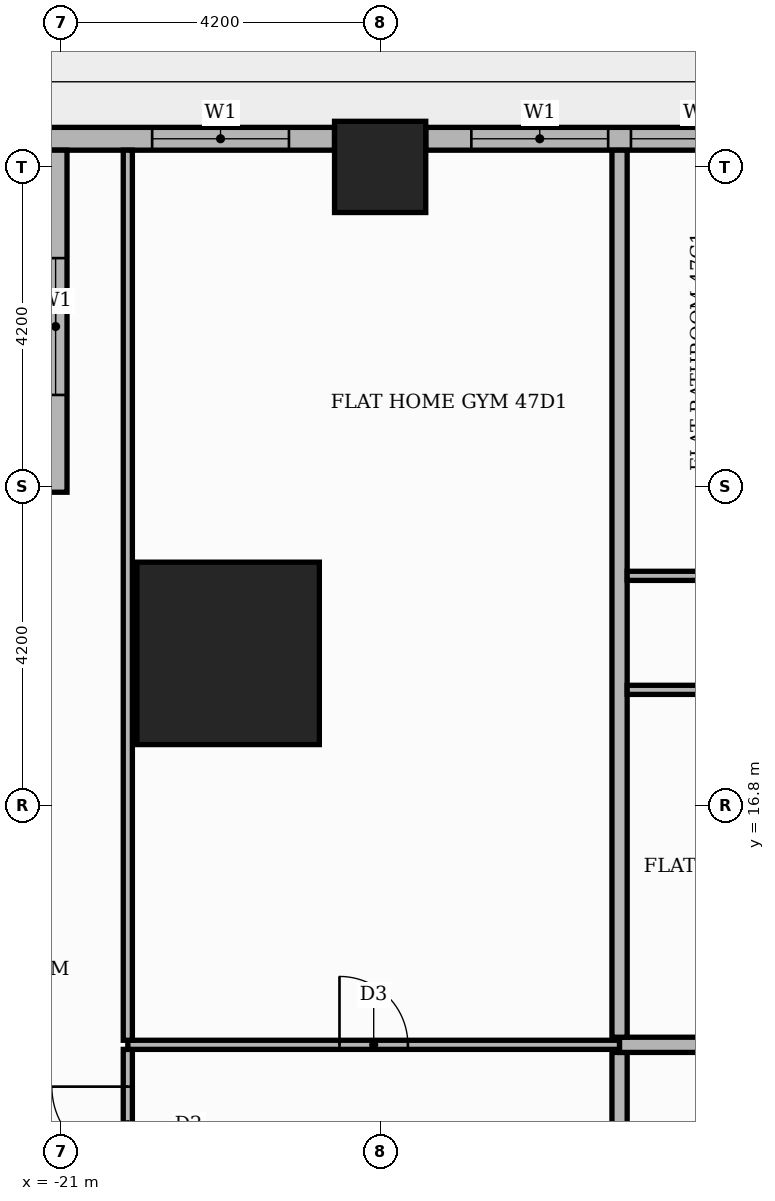
"""IFC4 building model, lengths in metres.
Left out: names, types, materials, properties, quantities, classifications, styles, units other than length and angle.
Written with IfcOpenShell. Run it as: python <this file> out.ifc"""

import sys

from ifc_helpers import new_model, si_unit, direction, frame, frame_2d, origin, origin_2d, place, context, subcontext, project, spatial, rectangle, extrude, element, fill, save


model = new_model("IFC4")
c1 = context("Model", 3, precision=1e-05, world=origin(), true_north=direction((0.0, 1.0)))
c2 = subcontext(c1, "Body", "Model", "MODEL_VIEW")
j1 = project(units=[si_unit("LENGTHUNIT", "METRE"), si_unit("PLANEANGLEUNIT", "RADIAN")], contexts=[c1])
p1 = place(None, origin())
s1 = spatial("IfcSite", under=j1, at=p1, CompositionType="ELEMENT")
p2 = place(p1, origin())
s2 = spatial("IfcBuilding", under=s1, at=p2, CompositionType="ELEMENT")
p3 = place(p2, frame((0.0, 0.0, 200.1)))
s3 = spatial("IfcBuildingStorey", under=s2, at=p3, CompositionType="ELEMENT", Elevation=200.1)
p4 = place(p3, frame((-18.8, 18.8, 0.0), z_axis=(0.0, 0.0, 1.0), x_axis=(1.0, 0.0, 0.0)))
e1 = element("IfcColumn", 1, at=p4, inside=s3, PredefinedType="COLUMN", context=c2, shape_type="SweptSolid", body=[
    extrude(rectangle(XDim=2.4, YDim=2.4, at=origin_2d()), origin(), (0.0, 0.0, 1.0), 3.9),
])
p5 = place(p3, frame((-16.8, 25.2, 0.0), z_axis=(0.0, 0.0, 1.0), x_axis=(1.0, 0.0, 0.0)))
e2 = element("IfcColumn", 2, at=p5, inside=s3, PredefinedType="COLUMN", context=c2, shape_type="SweptSolid", body=[
    extrude(rectangle(XDim=1.2, YDim=1.2, at=origin_2d()), origin(), (0.0, 0.0, 1.0), 3.9),
])
p6 = place(p3, frame((-9.0, 25.57, 0.0), z_axis=(0.0, 0.0, 1.0), x_axis=(-1.0, 0.0, 0.0)))
e3 = element("IfcWall", 3, at=p6, inside=s3, PredefinedType="STANDARD", context=c2, shape_type="SweptSolid", body=[
    extrude(rectangle(XDim=7.2, YDim=0.3, at=frame_2d((3.6, 0.0))), origin(), (0.0, 0.0, 1.0), 3.48),
])
p7 = place(p6, frame((0.6, 0.0, 0.9)))
e4 = element("IfcOpeningElement", 4, at=p7, cuts=e3, PredefinedType="OPENING", context=c2, shape_type="SweptSolid", body=[
    extrude(rectangle(XDim=1.8, YDim=2.1, at=frame_2d((0.9, 1.05))), frame((0.0, 0.16, 0.0), z_axis=(0.0, -1.0, 0.0), x_axis=(1.0, 0.0, 0.0)), (0.0, 0.0, 1.0), 0.32),
])
p8 = place(p6, frame((2.7, 0.0, 0.9)))
e5 = element("IfcOpeningElement", 5, at=p8, cuts=e3, PredefinedType="OPENING", context=c2, shape_type="SweptSolid", body=[
    extrude(rectangle(XDim=1.8, YDim=2.1, at=frame_2d((0.9, 1.05))), frame((0.0, 0.16, 0.0), z_axis=(0.0, -1.0, 0.0), x_axis=(1.0, 0.0, 0.0)), (0.0, 0.0, 1.0), 0.32),
])
p9 = place(p6, frame((4.8, 0.0, 0.9)))
e6 = element("IfcOpeningElement", 6, at=p9, cuts=e3, PredefinedType="OPENING", context=c2, shape_type="SweptSolid", body=[
    extrude(rectangle(XDim=1.8, YDim=2.1, at=frame_2d((0.9, 1.05))), frame((0.0, 0.16, 0.0), z_axis=(0.0, -1.0, 0.0), x_axis=(1.0, 0.0, 0.0)), (0.0, 0.0, 1.0), 0.32),
])
p10 = place(p3, frame((-17.4, 25.57, 0.0), z_axis=(0.0, 0.0, 1.0), x_axis=(-1.0, 0.0, 0.0)))
e7 = element("IfcWall", 7, at=p10, inside=s3, PredefinedType="STANDARD", context=c2, shape_type="SweptSolid", body=[
    extrude(rectangle(XDim=3.82, YDim=0.3, at=frame_2d((1.91, 0.0))), origin(), (0.0, 0.0, 1.0), 3.48),
])
p11 = place(p10, frame((0.6, 0.0, 0.9)))
e8 = element("IfcOpeningElement", 8, at=p11, cuts=e7, PredefinedType="OPENING", context=c2, shape_type="SweptSolid", body=[
    extrude(rectangle(XDim=1.8, YDim=2.1, at=frame_2d((0.9, 1.05))), frame((0.0, 0.16, 0.0), z_axis=(0.0, -1.0, 0.0), x_axis=(1.0, 0.0, 0.0)), (0.0, 0.0, 1.0), 0.32),
])
p12 = place(p3, frame((-21.07, 25.42, 0.0), z_axis=(0.0, 0.0, 1.0), x_axis=(0.0, -1.0, 0.0)))
e9 = element("IfcWall", 9, at=p12, inside=s3, PredefinedType="STANDARD", context=c2, shape_type="SweptSolid", body=[
    extrude(rectangle(XDim=4.5, YDim=0.3, at=frame_2d((2.25, 0.0))), origin(), (0.0, 0.0, 1.0), 3.48),
])
p13 = place(p12, frame((1.42, 0.0, 0.9)))
e10 = element("IfcOpeningElement", 10, at=p13, cuts=e9, PredefinedType="OPENING", context=c2, shape_type="SweptSolid", body=[
    extrude(rectangle(XDim=1.8, YDim=2.1, at=frame_2d((0.9, 1.05))), frame((0.0, 0.16, 0.0), z_axis=(0.0, -1.0, 0.0), x_axis=(1.0, 0.0, 0.0)), (0.0, 0.0, 1.0), 0.32),
])
p14 = place(p3, frame((-13.65, -13.55, 0.0), z_axis=(0.0, 0.0, 1.0), x_axis=(0.0, 1.0, 0.0)))
e11 = element("IfcWall", 11, at=p14, inside=s3, PredefinedType="PARTITIONING", context=c2, shape_type="SweptSolid", body=[
    extrude(rectangle(XDim=27.1, YDim=0.2, at=frame_2d((13.55, 0.0))), origin(), (0.0, 0.0, 1.0), 3.48),
])
p15 = place(p14, frame((23.5, 0.0, 0.0)))
e12 = element("IfcOpeningElement", 12, at=p15, cuts=e11, PredefinedType="OPENING", context=c2, shape_type="SweptSolid", body=[
    extrude(rectangle(XDim=1.1, YDim=2.4, at=frame_2d((0.55, 1.2))), frame((0.0, 0.11, 0.0), z_axis=(0.0, -1.0, 0.0), x_axis=(1.0, 0.0, 0.0)), (0.0, 0.0, 1.0), 0.22),
])
p16 = place(p3, frame((-20.12, 11.61, 0.0), z_axis=(0.0, 0.0, 1.0), x_axis=(0.0, 1.0, 0.0)))
e13 = element("IfcWall", 13, at=p16, inside=s3, PredefinedType="PARTITIONING", context=c2, shape_type="SweptSolid", body=[
    extrude(rectangle(XDim=1.98, YDim=0.12, at=frame_2d((0.99, 0.0))), origin(), (0.0, 0.0, 1.0), 3.48),
])
p17 = place(p16, frame((0.49, 0.0, 0.0)))
e14 = element("IfcOpeningElement", 14, at=p17, cuts=e13, PredefinedType="OPENING", context=c2, shape_type="SweptSolid", body=[
    extrude(rectangle(XDim=1.0, YDim=2.1, at=frame_2d((0.5, 1.05))), frame((0.0, 0.07, 0.0), z_axis=(0.0, -1.0, 0.0), x_axis=(1.0, 0.0, 0.0)), (0.0, 0.0, 1.0), 0.14),
])
p18 = place(p3, frame((-20.12, 13.65, 0.0), z_axis=(0.0, 0.0, 1.0), x_axis=(1.0, 0.0, 0.0)))
e15 = element("IfcWall", 15, at=p18, inside=s3, PredefinedType="PARTITIONING", context=c2, shape_type="SweptSolid", body=[
    extrude(rectangle(XDim=6.47, YDim=0.12, at=frame_2d((3.235, 0.0))), origin(), (0.0, 0.0, 1.0), 3.48),
])
p19 = place(p18, frame((2.785, 0.0, 0.0)))
e16 = element("IfcOpeningElement", 16, at=p19, cuts=e15, PredefinedType="OPENING", context=c2, shape_type="SweptSolid", body=[
    extrude(rectangle(XDim=0.9, YDim=2.1, at=frame_2d((0.45, 1.05))), frame((0.0, 0.07, 0.0), z_axis=(0.0, -1.0, 0.0), x_axis=(1.0, 0.0, 0.0)), (0.0, 0.0, 1.0), 0.14),
])
p20 = place(p3, frame((-13.65, 13.65, 0.0), z_axis=(0.0, 0.0, 1.0), x_axis=(1.0, 0.0, 0.0)))
e17 = element("IfcWall", 17, at=p20, inside=s3, PredefinedType="PARTITIONING", context=c2, shape_type="SweptSolid", body=[
    extrude(rectangle(XDim=39.07, YDim=0.2, at=frame_2d((19.535, 0.0))), origin(), (0.0, 0.0, 1.0), 3.48),
])
p21 = place(p20, frame((23.6, 0.0, 0.0)))
e18 = element("IfcOpeningElement", 18, at=p21, cuts=e17, PredefinedType="OPENING", context=c2, shape_type="SweptSolid", body=[
    extrude(rectangle(XDim=1.1, YDim=2.4, at=frame_2d((0.55, 1.2))), frame((0.0, 0.11, 0.0), z_axis=(0.0, -1.0, 0.0), x_axis=(1.0, 0.0, 0.0)), (0.0, 0.0, 1.0), 0.22),
])
p22 = place(p3, frame((-20.12, 13.71, 0.0), z_axis=(0.0, 0.0, 1.0), x_axis=(0.0, 1.0, 0.0)))
e19 = element("IfcWall", 19, at=p22, inside=s3, PredefinedType="PARTITIONING", context=c2, shape_type="SweptSolid", body=[
    extrude(rectangle(XDim=11.71, YDim=0.12, at=frame_2d((5.855, 0.0))), origin(), (0.0, 0.0, 1.0), 3.48),
])
p23 = place(p3, frame((-13.65, 13.75, 0.0), z_axis=(0.0, 0.0, 1.0), x_axis=(0.0, 1.0, 0.0)))
e20 = element("IfcWall", 20, at=p23, inside=s3, PredefinedType="PARTITIONING", context=c2, shape_type="SweptSolid", body=[
    extrude(rectangle(XDim=11.67, YDim=0.2, at=frame_2d((5.835, 0.0))), origin(), (0.0, 0.0, 1.0), 3.48),
])
p24 = place(p3, frame((-13.55, 18.32, 0.0), z_axis=(0.0, 0.0, 1.0), x_axis=(1.0, 0.0, 0.0)))
e21 = element("IfcWall", 21, at=p24, inside=s3, PredefinedType="PARTITIONING", context=c2, shape_type="SweptSolid", body=[
    extrude(rectangle(XDim=20.9, YDim=0.12, at=frame_2d((10.45, 0.0))), origin(), (0.0, 0.0, 1.0), 3.48),
])
p25 = place(p24, frame((17.225, 0.0, 0.0)))
e22 = element("IfcOpeningElement", 22, at=p25, cuts=e21, PredefinedType="OPENING", context=c2, shape_type="SweptSolid", body=[
    extrude(rectangle(XDim=0.9, YDim=2.1, at=frame_2d((0.45, 1.05))), frame((0.0, 0.07, 0.0), z_axis=(0.0, -1.0, 0.0), x_axis=(1.0, 0.0, 0.0)), (0.0, 0.0, 1.0), 0.14),
])
p26 = place(p24, frame((11.9, 0.0, 0.0)))
e23 = element("IfcOpeningElement", 23, at=p26, cuts=e21, PredefinedType="OPENING", context=c2, shape_type="SweptSolid", body=[
    extrude(rectangle(XDim=0.9, YDim=2.1, at=frame_2d((0.45, 1.05))), frame((0.0, 0.07, 0.0), z_axis=(0.0, -1.0, 0.0), x_axis=(1.0, 0.0, 0.0)), (0.0, 0.0, 1.0), 0.14),
])
p27 = place(p24, frame((8.825, 0.0, 0.0)))
e24 = element("IfcOpeningElement", 24, at=p27, cuts=e21, PredefinedType="OPENING", context=c2, shape_type="SweptSolid", body=[
    extrude(rectangle(XDim=0.9, YDim=2.1, at=frame_2d((0.45, 1.05))), frame((0.0, 0.07, 0.0), z_axis=(0.0, -1.0, 0.0), x_axis=(1.0, 0.0, 0.0)), (0.0, 0.0, 1.0), 0.14),
])
p28 = place(p24, frame((6.05, 0.0, 0.0)))
e25 = element("IfcOpeningElement", 25, at=p28, cuts=e21, PredefinedType="OPENING", context=c2, shape_type="SweptSolid", body=[
    extrude(rectangle(XDim=0.9, YDim=2.1, at=frame_2d((0.45, 1.05))), frame((0.0, 0.07, 0.0), z_axis=(0.0, -1.0, 0.0), x_axis=(1.0, 0.0, 0.0)), (0.0, 0.0, 1.0), 0.14),
])
p29 = place(p24, frame((1.85, 0.0, 0.0)))
e26 = element("IfcOpeningElement", 26, at=p29, cuts=e21, PredefinedType="OPENING", context=c2, shape_type="SweptSolid", body=[
    extrude(rectangle(XDim=0.9, YDim=2.1, at=frame_2d((0.45, 1.05))), frame((0.0, 0.07, 0.0), z_axis=(0.0, -1.0, 0.0), x_axis=(1.0, 0.0, 0.0)), (0.0, 0.0, 1.0), 0.14),
])
p30 = place(p3, frame((-13.55, 19.82, 0.0), z_axis=(0.0, 0.0, 1.0), x_axis=(1.0, 0.0, 0.0)))
e27 = element("IfcWall", 27, at=p30, inside=s3, PredefinedType="PARTITIONING", context=c2, shape_type="SweptSolid", body=[
    extrude(rectangle(XDim=31.15, YDim=0.12, at=frame_2d((15.575, 0.0))), origin(), (0.0, 0.0, 1.0), 3.48),
])
p31 = place(p30, frame((25.65, 0.0, 0.0)))
e28 = element("IfcOpeningElement", 28, at=p31, cuts=e27, PredefinedType="OPENING", context=c2, shape_type="SweptSolid", body=[
    extrude(rectangle(XDim=1.0, YDim=2.1, at=frame_2d((0.5, 1.05))), frame((0.0, 0.07, 0.0), z_axis=(0.0, -1.0, 0.0), x_axis=(1.0, 0.0, 0.0)), (0.0, 0.0, 1.0), 0.14),
])
p32 = place(p30, frame((22.55, 0.0, 0.0)))
e29 = element("IfcOpeningElement", 29, at=p32, cuts=e27, PredefinedType="OPENING", context=c2, shape_type="SweptSolid", body=[
    extrude(rectangle(XDim=0.9, YDim=2.1, at=frame_2d((0.45, 1.05))), frame((0.0, 0.07, 0.0), z_axis=(0.0, -1.0, 0.0), x_axis=(1.0, 0.0, 0.0)), (0.0, 0.0, 1.0), 0.14),
])
p33 = place(p30, frame((18.35, 0.0, 0.0)))
e30 = element("IfcOpeningElement", 30, at=p33, cuts=e27, PredefinedType="OPENING", context=c2, shape_type="SweptSolid", body=[
    extrude(rectangle(XDim=0.9, YDim=2.1, at=frame_2d((0.45, 1.05))), frame((0.0, 0.07, 0.0), z_axis=(0.0, -1.0, 0.0), x_axis=(1.0, 0.0, 0.0)), (0.0, 0.0, 1.0), 0.14),
])
p34 = place(p30, frame((9.95, 0.0, 0.0)))
e31 = element("IfcOpeningElement", 31, at=p34, cuts=e27, PredefinedType="OPENING", context=c2, shape_type="SweptSolid", body=[
    extrude(rectangle(XDim=0.9, YDim=2.1, at=frame_2d((0.45, 1.05))), frame((0.0, 0.07, 0.0), z_axis=(0.0, -1.0, 0.0), x_axis=(1.0, 0.0, 0.0)), (0.0, 0.0, 1.0), 0.14),
])
p35 = place(p30, frame((3.65, 0.0, 0.0)))
e32 = element("IfcOpeningElement", 32, at=p35, cuts=e27, PredefinedType="OPENING", context=c2, shape_type="SweptSolid", body=[
    extrude(rectangle(XDim=0.9, YDim=2.1, at=frame_2d((0.45, 1.05))), frame((0.0, 0.07, 0.0), z_axis=(0.0, -1.0, 0.0), x_axis=(1.0, 0.0, 0.0)), (0.0, 0.0, 1.0), 0.14),
])
p36 = place(p8, origin())
e33 = element("IfcWindow", 33, at=p36, inside=s3, PartitioningType="SINGLE_PANEL", PredefinedType="WINDOW", context=c2, shape_type="SweptSolid", body=[
    extrude(rectangle(XDim=1.8, YDim=2.1, at=frame_2d((0.9, 1.05))), frame((0.0, 0.03, 0.0), z_axis=(0.0, -1.0, 0.0), x_axis=(1.0, 0.0, 0.0)), (0.0, 0.0, 1.0), 0.06),
])
fill(e5, e33)
p37 = place(p9, origin())
e34 = element("IfcWindow", 34, at=p37, inside=s3, PartitioningType="SINGLE_PANEL", PredefinedType="WINDOW", context=c2, shape_type="SweptSolid", body=[
    extrude(rectangle(XDim=1.8, YDim=2.1, at=frame_2d((0.9, 1.05))), frame((0.0, 0.03, 0.0), z_axis=(0.0, -1.0, 0.0), x_axis=(1.0, 0.0, 0.0)), (0.0, 0.0, 1.0), 0.06),
])
fill(e6, e34)
p38 = place(p11, origin())
e35 = element("IfcWindow", 35, at=p38, inside=s3, PartitioningType="SINGLE_PANEL", PredefinedType="WINDOW", context=c2, shape_type="SweptSolid", body=[
    extrude(rectangle(XDim=1.8, YDim=2.1, at=frame_2d((0.9, 1.05))), frame((0.0, 0.03, 0.0), z_axis=(0.0, -1.0, 0.0), x_axis=(1.0, 0.0, 0.0)), (0.0, 0.0, 1.0), 0.06),
])
fill(e8, e35)
p39 = place(p13, origin())
e36 = element("IfcWindow", 36, at=p39, inside=s3, PartitioningType="SINGLE_PANEL", PredefinedType="WINDOW", context=c2, shape_type="SweptSolid", body=[
    extrude(rectangle(XDim=1.8, YDim=2.1, at=frame_2d((0.9, 1.05))), frame((0.0, 0.03, 0.0), z_axis=(0.0, -1.0, 0.0), x_axis=(1.0, 0.0, 0.0)), (0.0, 0.0, 1.0), 0.06),
])
fill(e10, e36)
p40 = place(p19, origin())
e37 = element("IfcDoor", 37, at=p40, inside=s3, OperationType="SINGLE_SWING_LEFT", PredefinedType="DOOR", context=c2, shape_type="SweptSolid", body=[
    extrude(rectangle(XDim=0.9, YDim=2.1, at=frame_2d((0.45, 1.05))), frame((0.0, 0.025, 0.0), z_axis=(0.0, -1.0, 0.0), x_axis=(1.0, 0.0, 0.0)), (0.0, 0.0, 1.0), 0.05),
])
fill(e16, e37)
p41 = place(p17, origin())
e38 = element("IfcDoor", 38, at=p41, inside=s3, OperationType="SINGLE_SWING_RIGHT", PredefinedType="DOOR", context=c2, shape_type="SweptSolid", body=[
    extrude(rectangle(XDim=1.0, YDim=2.1, at=frame_2d((0.5, 1.05))), frame((0.0, 0.025, 0.0), z_axis=(0.0, -1.0, 0.0), x_axis=(1.0, 0.0, 0.0)), (0.0, 0.0, 1.0), 0.05),
])
fill(e14, e38)
save(model, sys.argv[1])
